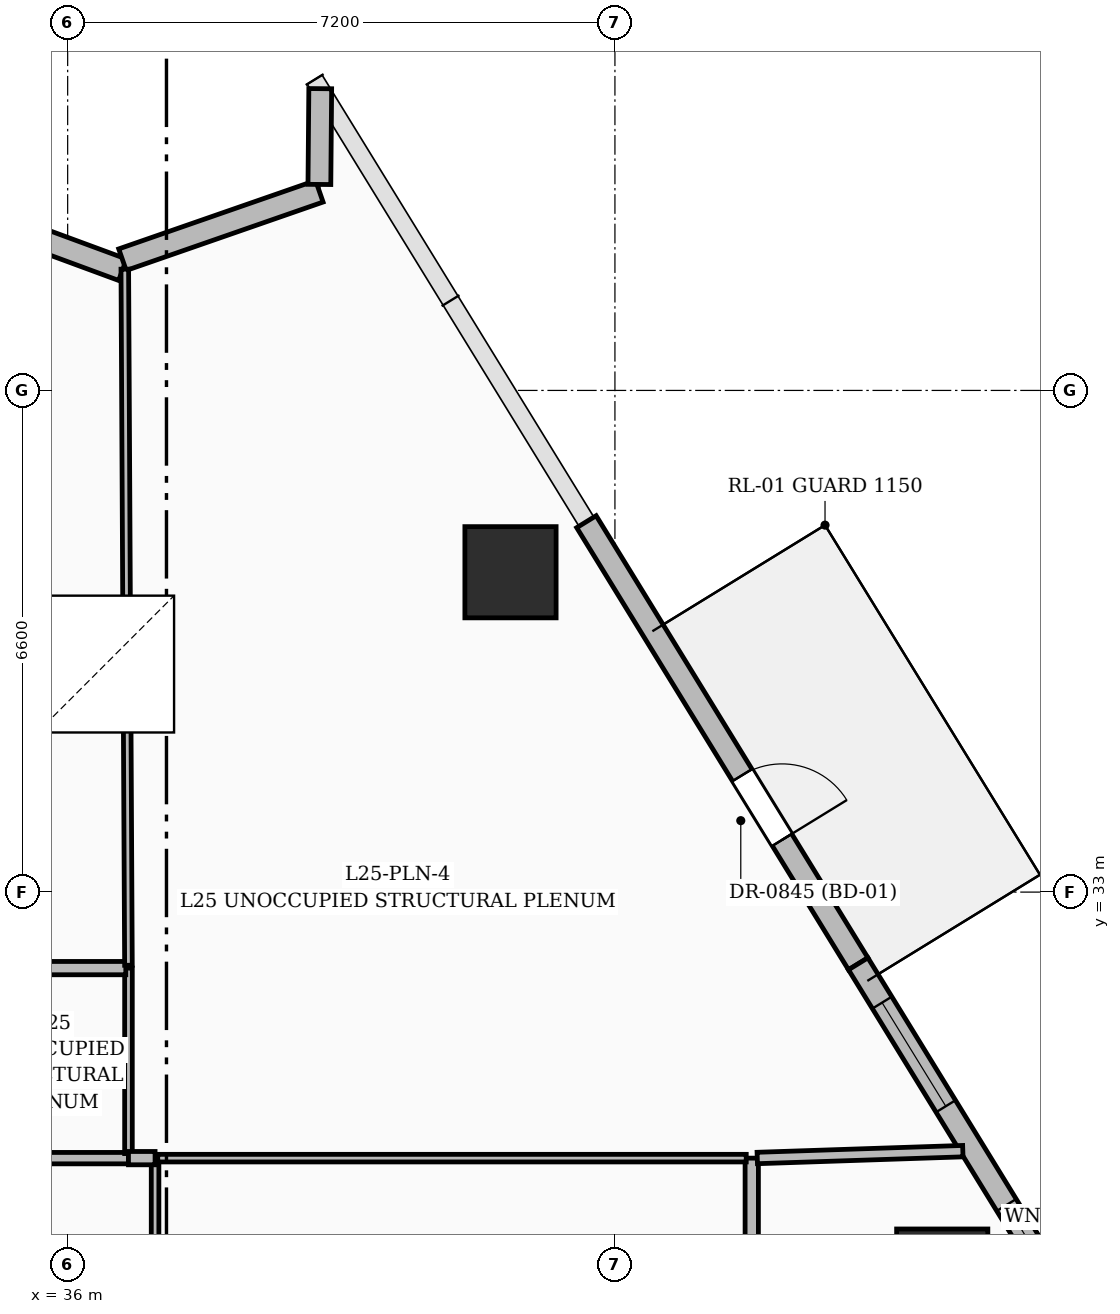
"""IFC4 building model, lengths in metres.
Left out: names, types, materials, properties, quantities, classifications, styles, units other than length and angle.
Written with IfcOpenShell. Run it as: python <this file> out.ifc"""

import sys

from ifc_helpers import new_model, si_unit, direction, frame, frame_2d, origin, origin_2d, place, context, subcontext, project, spatial, rectangle, extrude, element, fill, save


model = new_model("IFC4")
c1 = context("Model", 3, precision=1e-05, world=origin(), true_north=direction((0.0, 1.0)))
c2 = subcontext(c1, "Body", "Model", "MODEL_VIEW")
j1 = project(units=[si_unit("LENGTHUNIT", "METRE"), si_unit("PLANEANGLEUNIT", "RADIAN")], contexts=[c1])
p1 = place(None, origin())
s1 = spatial("IfcSite", under=j1, at=p1, CompositionType="ELEMENT")
p2 = place(p1, origin())
s2 = spatial("IfcBuilding", under=s1, at=p2, CompositionType="ELEMENT")
p3 = place(p2, frame((0.0, 0.0, 100.2)))
s3 = spatial("IfcBuildingStorey", under=s2, at=p3, CompositionType="ELEMENT", Elevation=100.2)
for number, where, z_axis, x_axis in (
    (1, (47.506, 27.968, 0.0), (0.0, 0.0, 1.0), (1.0, 0.0, 0.0)),
    (2, (41.826, 37.208, 0.0), (0.0, 0.0, 1.0), (1.0, 0.0, 0.0)),
):
    element("IfcColumn", number, at=place(p3, frame(where, z_axis=z_axis, x_axis=x_axis)), inside=s3, PredefinedType="COLUMN", context=c2, shape_type="SweptSolid", body=[
        extrude(rectangle(XDim=1.2, YDim=1.2, at=origin_2d()), origin(), (0.0, 0.0, 1.0), 4.8),
    ])
p4 = place(p3, frame((33.862, 42.243, 0.0), z_axis=(0.0, 0.0, 1.0), x_axis=(0.938226878727, -0.346020698853, 0.0)))
e3 = element("IfcWall", 3, at=p4, inside=s3, PredefinedType="SOLIDWALL", context=c2, shape_type="SweptSolid", body=[
    extrude(rectangle(XDim=3.05, YDim=0.3, at=frame_2d((1.525, 0.0))), origin(), (0.0, 0.0, 1.0), 4.5),
])
p5 = place(p4, frame((0.715, 0.0, 0.8)))
e4 = element("IfcOpeningElement", 4, at=p5, cuts=e3, PredefinedType="OPENING", context=c2, shape_type="SweptSolid", body=[
    extrude(rectangle(XDim=1.2, YDim=1.8, at=frame_2d((0.6, 0.9))), frame((0.0, 0.16, 0.0), z_axis=(0.0, -1.0, 0.0), x_axis=(1.0, 0.0, 0.0)), (0.0, 0.0, 1.0), 0.32),
])
p6 = place(p3, frame((36.721, 41.32, 0.0), z_axis=(0.0, 0.0, 1.0), x_axis=(0.944600061393, 0.328223588452, 0.0)))
e5 = element("IfcWall", 5, at=p6, inside=s3, PredefinedType="SOLIDWALL", context=c2, shape_type="SweptSolid", body=[
    extrude(rectangle(XDim=2.742, YDim=0.3, at=frame_2d((1.371, 0.0))), origin(), (0.0, 0.0, 1.0), 4.5),
])
p7 = place(p3, frame((39.312, 42.31, 0.0), z_axis=(0.0, 0.0, 1.0), x_axis=(0.008912647346, 0.99996028157, 0.0)))
e6 = element("IfcWall", 6, at=p7, inside=s3, PredefinedType="SOLIDWALL", context=c2, shape_type="SweptSolid", body=[
    extrude(rectangle(XDim=1.26, YDim=0.3, at=frame_2d((0.63, 0.0))), origin(), (0.0, 0.0, 1.0), 4.5),
])
p8 = place(p3, frame((42.825, 37.873, 0.0), z_axis=(0.0, 0.0, 1.0), x_axis=(0.523658422803, -0.851928316366, 0.0)))
e7 = element("IfcWall", 7, at=p8, inside=s3, PredefinedType="SOLIDWALL", context=c2, shape_type="SweptSolid", body=[
    extrude(rectangle(XDim=6.827, YDim=0.3, at=frame_2d((3.414, 0.0))), origin(), (0.0, 0.0, 1.0), 4.5),
])
p9 = place(p8, frame((3.914, 0.0, 0.0)))
e8 = element("IfcOpeningElement", 8, at=p9, cuts=e7, PredefinedType="OPENING", context=c2, shape_type="SweptSolid", body=[
    extrude(rectangle(XDim=1.0, YDim=2.2, at=frame_2d((0.5, 1.1))), frame((0.0, 0.16, 0.0), z_axis=(0.0, -1.0, 0.0), x_axis=(1.0, 0.0, 0.0)), (0.0, 0.0, 1.0), 0.32),
])
p10 = place(p3, frame((46.4, 32.057, 0.0), z_axis=(0.0, 0.0, 1.0), x_axis=(0.523716283242, -0.851892748336, 0.0)))
e9 = element("IfcWall", 9, at=p10, inside=s3, PredefinedType="SOLIDWALL", context=c2, shape_type="SweptSolid", body=[
    extrude(rectangle(XDim=6.827, YDim=0.3, at=frame_2d((3.414, 0.0))), origin(), (0.0, 0.0, 1.0), 4.5),
])
p11 = place(p10, frame((3.725, 0.0, 0.55)))
e10 = element("IfcOpeningElement", 10, at=p11, cuts=e9, PredefinedType="OPENING", context=c2, shape_type="SweptSolid", body=[
    extrude(rectangle(XDim=1.6, YDim=2.2, at=frame_2d((0.8, 1.1))), frame((0.0, 0.16, 0.0), z_axis=(0.0, -1.0, 0.0), x_axis=(1.0, 0.0, 0.0)), (0.0, 0.0, 1.0), 0.32),
])
p12 = place(p10, frame((0.6, 0.0, 0.55)))
e11 = element("IfcOpeningElement", 11, at=p12, cuts=e9, PredefinedType="OPENING", context=c2, shape_type="SweptSolid", body=[
    extrude(rectangle(XDim=1.6, YDim=2.2, at=frame_2d((0.8, 1.1))), frame((0.0, 0.16, 0.0), z_axis=(0.0, -1.0, 0.0), x_axis=(1.0, 0.0, 0.0)), (0.0, 0.0, 1.0), 0.32),
])
p13 = place(p3, frame((34.8, 29.5, 0.0), z_axis=(0.0, 0.0, 1.0), x_axis=(1.0, 0.0, 0.0)))
e12 = element("IfcWall", 12, at=p13, inside=s3, PredefinedType="PARTITIONING", context=c2, shape_type="SweptSolid", body=[
    extrude(rectangle(XDim=2.0, YDim=0.15, at=frame_2d((1.0, 0.0))), origin(), (0.0, 0.0, 1.0), 2.27),
])
p14 = place(p3, frame((36.8, 29.56, 0.0), z_axis=(0.0, 0.0, 1.0), x_axis=(0.0, 1.0, 0.0)))
e13 = element("IfcWall", 13, at=p14, inside=s3, PredefinedType="PARTITIONING", context=c2, shape_type="SweptSolid", body=[
    extrude(rectangle(XDim=2.44, YDim=0.1, at=frame_2d((1.22, 0.0))), origin(), (0.0, 0.0, 1.0), 4.061),
])
p15 = place(p3, frame((36.765, 32.0, 0.0), z_axis=(0.0, 0.0, 1.0), x_axis=(-1.0, 0.0, 0.0)))
e14 = element("IfcWall", 14, at=p15, inside=s3, PredefinedType="PARTITIONING", context=c2, shape_type="SweptSolid", body=[
    extrude(rectangle(XDim=1.965, YDim=0.175, at=frame_2d((0.982, 0.0))), origin(), (0.0, 0.0, 1.0), 4.5),
])
p16 = place(p3, frame((37.15, 23.6, 0.0), z_axis=(0.0, 0.0, 1.0), x_axis=(0.0, 1.0, 0.0)))
e15 = element("IfcWall", 15, at=p16, inside=s3, PredefinedType="PARTITIONING", context=c2, shape_type="SweptSolid", body=[
    extrude(rectangle(XDim=5.9, YDim=0.1, at=frame_2d((2.95, 0.0))), origin(), (0.0, 0.0, 1.0), 2.27),
])
p17 = place(p3, frame((37.15, 29.5, 0.0), z_axis=(0.0, 0.0, 1.0), x_axis=(-1.0, 0.0, 0.0)))
e16 = element("IfcWall", 16, at=p17, inside=s3, PredefinedType="PARTITIONING", context=c2, shape_type="SweptSolid", body=[
    extrude(rectangle(XDim=0.35, YDim=0.175, at=frame_2d((0.175, 0.0))), origin(), (0.0, 0.0, 1.0), 4.5),
])
p18 = place(p3, frame((45.0, 29.5, 0.0), z_axis=(0.0, 0.0, 1.0), x_axis=(0.0, -1.0, 0.0)))
e17 = element("IfcWall", 17, at=p18, inside=s3, PredefinedType="PARTITIONING", context=c2, shape_type="SweptSolid", body=[
    extrude(rectangle(XDim=5.9, YDim=0.175, at=frame_2d((2.95, 0.0))), origin(), (0.0, 0.0, 1.0), 4.061),
])
p19 = place(p3, frame((47.777, 29.592, 0.0), z_axis=(0.0, 0.0, 1.0), x_axis=(-0.999445707747, -0.033290798534, 0.0)))
e18 = element("IfcWall", 18, at=p19, inside=s3, PredefinedType="PARTITIONING", context=c2, shape_type="SweptSolid", body=[
    extrude(rectangle(XDim=2.706, YDim=0.15, at=frame_2d((1.353, 0.0))), origin(), (0.0, 0.0, 1.0), 3.52),
])
p20 = place(p3, frame((44.927, 29.5, 0.0), z_axis=(0.0, 0.0, 1.0), x_axis=(-1.0, 0.0, 0.0)))
e19 = element("IfcWall", 19, at=p20, inside=s3, PredefinedType="PARTITIONING", context=c2, shape_type="SweptSolid", body=[
    extrude(rectangle(XDim=7.742, YDim=0.1, at=frame_2d((3.871, 0.0))), origin(), (0.0, 0.0, 1.0), 2.27),
])
p21 = place(p3, frame((36.752, 41.195, 0.0), z_axis=(0.0, 0.0, 1.0), x_axis=(0.005251860388, -0.999986208886, 0.0)))
e20 = element("IfcWall", 20, at=p21, inside=s3, PredefinedType="PARTITIONING", context=c2, shape_type="SweptSolid", body=[
    extrude(rectangle(XDim=9.158, YDim=0.1, at=frame_2d((4.579, 0.0))), origin(), (0.0, 0.0, 1.0), 3.52),
])
p22 = place(p9, origin())
e21 = element("IfcDoor", 21, at=p22, inside=s3, OperationType="SINGLE_SWING_RIGHT", PredefinedType="DOOR", context=c2, shape_type="SweptSolid", body=[
    extrude(rectangle(XDim=1.0, YDim=2.2, at=frame_2d((0.5, 1.1))), frame((0.0, 0.025, 0.0), z_axis=(0.0, -1.0, 0.0), x_axis=(1.0, 0.0, 0.0)), (0.0, 0.0, 1.0), 0.05),
])
fill(e8, e21)
p23 = place(p11, origin())
e22 = element("IfcWindow", 22, at=p23, inside=s3, PartitioningType="SINGLE_PANEL", PredefinedType="WINDOW", context=c2, shape_type="SweptSolid", body=[
    extrude(rectangle(XDim=1.6, YDim=2.2, at=frame_2d((0.8, 1.1))), frame((0.0, 0.03, 0.0), z_axis=(0.0, -1.0, 0.0), x_axis=(1.0, 0.0, 0.0)), (0.0, 0.0, 1.0), 0.06),
])
fill(e10, e22)
p24 = place(p12, origin())
e23 = element("IfcWindow", 23, at=p24, inside=s3, PartitioningType="SINGLE_PANEL", PredefinedType="WINDOW", context=c2, shape_type="SweptSolid", body=[
    extrude(rectangle(XDim=1.6, YDim=2.2, at=frame_2d((0.8, 1.1))), frame((0.0, 0.03, 0.0), z_axis=(0.0, -1.0, 0.0), x_axis=(1.0, 0.0, 0.0)), (0.0, 0.0, 1.0), 0.06),
])
fill(e11, e23)
p25 = place(p3, frame((0.0, 0.0, -0.3)))
p26 = place(p25, frame((36.5, 36.0, 0.0)))
p27 = place(p26, frame((0.0, 0.0, 0.25)))
e24 = element("IfcWindow", 24, at=p27, inside=s3, PartitioningType="SINGLE_PANEL", PredefinedType="SKYLIGHT", context=c2, shape_type="SweptSolid", body=[
    extrude(rectangle(XDim=1.8, YDim=1.8, at=origin_2d()), origin(), (0.0, 0.0, 1.0), 0.05),
])
save(model, sys.argv[1])
